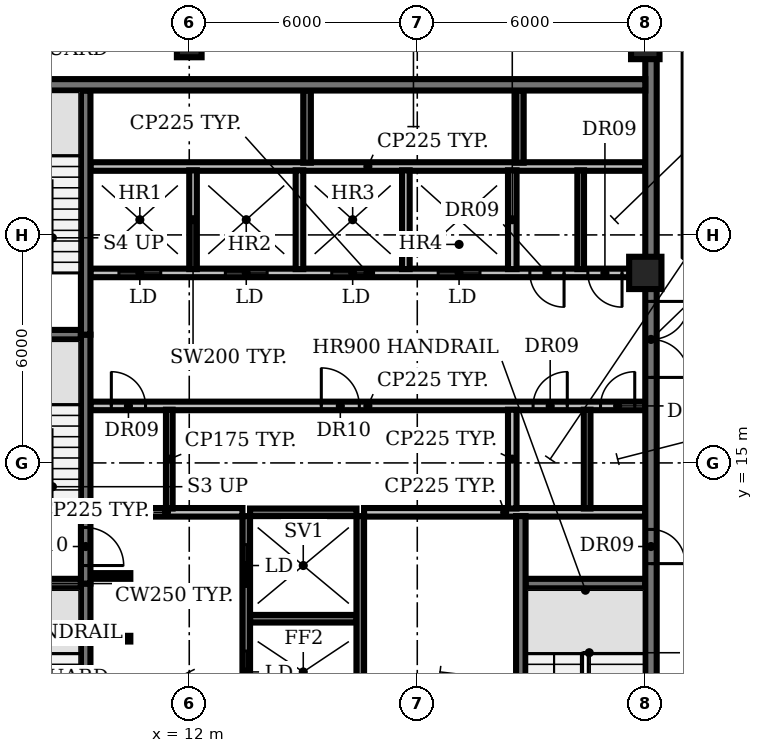
"""IFC4 building model, lengths in metres.
Left out: names, types, materials, properties, quantities, classifications, styles, units other than length and angle.
Written with IfcOpenShell. Run it as: python <this file> out.ifc"""

import sys

from ifc_helpers import new_model, si_unit, direction, frame, frame_2d, origin, origin_2d, place, context, subcontext, project, spatial, rectangle, circle, extrude, element, fill, save


model = new_model("IFC4")
c1 = context("Model", 3, precision=1e-05, world=origin(), true_north=direction((0.0, 1.0)))
c2 = subcontext(c1, "Body", "Model", "MODEL_VIEW")
j1 = project(units=[si_unit("LENGTHUNIT", "METRE"), si_unit("PLANEANGLEUNIT", "RADIAN")], contexts=[c1])
p1 = place(None, origin())
s1 = spatial("IfcSite", under=j1, at=p1, CompositionType="ELEMENT")
p2 = place(p1, origin())
s2 = spatial("IfcBuilding", under=s1, at=p2, CompositionType="ELEMENT")
p3 = place(p2, frame((0.0, 0.0, 285.2)))
s3 = spatial("IfcBuildingStorey", under=s2, at=p3, CompositionType="ELEMENT", Elevation=285.2)
p4 = place(p3, frame((12.0, 26.0, 0.0), z_axis=(0.0, 0.0, 1.0), x_axis=(1.0, 0.0, 0.0)))
e1 = element("IfcColumn", 1, at=p4, inside=s3, PredefinedType="COLUMN", context=c2, shape_type="SweptSolid", body=[
    extrude(rectangle(XDim=0.65, YDim=0.65, at=origin_2d()), origin(), (0.0, 0.0, 1.0), 3.85),
])
p5 = place(p3, frame((24.0, 20.0, 0.0), z_axis=(0.0, 0.0, 1.0), x_axis=(1.0, 0.0, 0.0)))
e2 = element("IfcColumn", 2, at=p5, inside=s3, PredefinedType="COLUMN", context=c2, shape_type="SweptSolid", body=[
    extrude(circle(Radius=0.425, at=origin_2d()), origin(), (0.0, 0.0, 1.0), 3.85),
])
p6 = place(p3, frame((24.0, 26.0, 0.0), z_axis=(0.0, 0.0, 1.0), x_axis=(1.0, 0.0, 0.0)))
e3 = element("IfcColumn", 3, at=p6, inside=s3, PredefinedType="COLUMN", context=c2, shape_type="SweptSolid", body=[
    extrude(rectangle(XDim=0.75, YDim=0.75, at=origin_2d()), origin(), (0.0, 0.0, 1.0), 3.85),
])
p7 = place(p3, frame((9.4, 10.375, 0.0), z_axis=(0.0, 0.0, 1.0), x_axis=(1.0, 0.0, 0.0)))
e4 = element("IfcWall", 4, at=p7, inside=s3, PredefinedType="SHEAR", context=c2, shape_type="SweptSolid", body=[
    extrude(rectangle(XDim=1.05, YDim=0.15, at=frame_2d((0.525, 0.0))), origin(), (0.0, 0.0, 1.0), 3.85),
])
p8 = place(p3, frame((13.6, 10.9, 0.0), z_axis=(0.0, 0.0, 1.0), x_axis=(1.0, 0.0, 0.0)))
e5 = element("IfcWall", 5, at=p8, inside=s3, PredefinedType="SHEAR", context=c2, shape_type="SweptSolid", body=[
    extrude(rectangle(XDim=2.8, YDim=0.2, at=frame_2d((1.4, 0.0))), origin(), (0.0, 0.0, 1.0), 3.85),
])
for number, where, z_axis, x_axis in (
    (6, (6.0, 11.825, 0.0), (0.0, 0.0, 1.0), (1.0, 0.0, 0.0)),
    (7, (20.85, 11.825, 0.0), (0.0, 0.0, 1.0), (1.0, 0.0, 0.0)),
):
    element("IfcWall", number, at=place(p3, frame(where, z_axis=z_axis, x_axis=x_axis)), inside=s3, PredefinedType="SHEAR", context=c2, shape_type="SweptSolid", body=[
        extrude(rectangle(XDim=3.15, YDim=0.25, at=frame_2d((1.575, 0.0))), origin(), (0.0, 0.0, 1.0), 3.85),
    ])
p9 = place(p3, frame((9.4, 12.025, 0.0), z_axis=(0.0, 0.0, 1.0), x_axis=(1.0, 0.0, 0.0)))
e8 = element("IfcWall", 8, at=p9, inside=s3, PredefinedType="SHEAR", context=c2, shape_type="SweptSolid", body=[
    extrude(rectangle(XDim=1.05, YDim=0.15, at=frame_2d((0.525, 0.0))), origin(), (0.0, 0.0, 1.0), 3.85),
])
p10 = place(p3, frame((9.4, 13.7, 0.0), z_axis=(0.0, 0.0, 1.0), x_axis=(1.0, 0.0, 0.0)))
e9 = element("IfcWall", 9, at=p10, inside=s3, PredefinedType="PARTITIONING", context=c2, shape_type="SweptSolid", body=[
    extrude(rectangle(XDim=4.0, YDim=0.225, at=frame_2d((2.0, 0.0))), origin(), (0.0, 0.0, 1.0), 3.85),
])
p11 = place(p3, frame((13.6, 13.7, 0.0), z_axis=(0.0, 0.0, 1.0), x_axis=(1.0, 0.0, 0.0)))
e10 = element("IfcWall", 10, at=p11, inside=s3, PredefinedType="SHEAR", context=c2, shape_type="SweptSolid", body=[
    extrude(rectangle(XDim=2.8, YDim=0.2, at=frame_2d((1.4, 0.0))), origin(), (0.0, 0.0, 1.0), 3.85),
])
p12 = place(p3, frame((16.6, 13.7, 0.0), z_axis=(0.0, 0.0, 1.0), x_axis=(1.0, 0.0, 0.0)))
e11 = element("IfcWall", 11, at=p12, inside=s3, PredefinedType="PARTITIONING", context=c2, shape_type="SweptSolid", body=[
    extrude(rectangle(XDim=7.4, YDim=0.225, at=frame_2d((3.7, 0.0))), origin(), (0.0, 0.0, 1.0), 3.85),
])
p13 = place(p3, frame((9.4, 16.5, 0.0), z_axis=(0.0, 0.0, 1.0), x_axis=(1.0, 0.0, 0.0)))
e12 = element("IfcWall", 12, at=p13, inside=s3, PredefinedType="PARTITIONING", context=c2, shape_type="SweptSolid", body=[
    extrude(rectangle(XDim=14.6, YDim=0.225, at=frame_2d((7.3, 0.0))), origin(), (0.0, 0.0, 1.0), 3.85),
])
p14 = place(p13, frame((0.55, 0.0, 0.0)))
e13 = element("IfcOpeningElement", 13, at=p14, cuts=e12, PredefinedType="OPENING", context=c2, shape_type="SweptSolid", body=[
    extrude(rectangle(XDim=0.9, YDim=2.1, at=frame_2d((0.45, 1.05))), frame((0.0, 0.123, 0.0), z_axis=(0.0, -1.0, 0.0), x_axis=(1.0, 0.0, 0.0)), (0.0, 0.0, 1.0), 0.245),
])
p15 = place(p13, frame((6.075, 0.0, 0.0)))
e14 = element("IfcOpeningElement", 14, at=p15, cuts=e12, PredefinedType="OPENING", context=c2, shape_type="SweptSolid", body=[
    extrude(rectangle(XDim=1.0, YDim=2.1, at=frame_2d((0.5, 1.05))), frame((0.0, 0.123, 0.0), z_axis=(0.0, -1.0, 0.0), x_axis=(1.0, 0.0, 0.0)), (0.0, 0.0, 1.0), 0.245),
])
p16 = place(p13, frame((11.647, 0.0, 0.0)))
e15 = element("IfcOpeningElement", 15, at=p16, cuts=e12, PredefinedType="OPENING", context=c2, shape_type="SweptSolid", body=[
    extrude(rectangle(XDim=0.9, YDim=2.1, at=frame_2d((0.45, 1.05))), frame((0.0, 0.123, 0.0), z_axis=(0.0, -1.0, 0.0), x_axis=(1.0, 0.0, 0.0)), (0.0, 0.0, 1.0), 0.245),
])
p17 = place(p13, frame((13.423, 0.0, 0.0)))
e16 = element("IfcOpeningElement", 16, at=p17, cuts=e12, PredefinedType="OPENING", context=c2, shape_type="SweptSolid", body=[
    extrude(rectangle(XDim=0.9, YDim=2.1, at=frame_2d((0.45, 1.05))), frame((0.0, 0.123, 0.0), z_axis=(0.0, -1.0, 0.0), x_axis=(1.0, 0.0, 0.0)), (0.0, 0.0, 1.0), 0.245),
])
p18 = place(p3, frame((6.0, 18.375, 0.0), z_axis=(0.0, 0.0, 1.0), x_axis=(1.0, 0.0, 0.0)))
e17 = element("IfcWall", 17, at=p18, inside=s3, PredefinedType="SHEAR", context=c2, shape_type="SweptSolid", body=[
    extrude(rectangle(XDim=3.15, YDim=0.25, at=frame_2d((1.575, 0.0))), origin(), (0.0, 0.0, 1.0), 3.85),
])
p19 = place(p3, frame((24.0, 20.0, 0.0), z_axis=(0.0, 0.0, 1.0), x_axis=(-1.0, 0.0, 0.0)))
e18 = element("IfcWall", 18, at=p19, inside=s3, PredefinedType="PARTITIONING", context=c2, shape_type="SweptSolid", body=[
    extrude(rectangle(XDim=14.6, YDim=0.225, at=frame_2d((7.3, 0.0))), origin(), (0.0, 0.0, 1.0), 3.85),
])
p20 = place(p19, frame((12.75, 0.0, 0.0)))
e19 = element("IfcOpeningElement", 19, at=p20, cuts=e18, PredefinedType="OPENING", context=c2, shape_type="SweptSolid", body=[
    extrude(rectangle(XDim=1.1, YDim=2.1, at=frame_2d((0.55, 1.05))), frame((0.0, 0.123, 0.0), z_axis=(0.0, -1.0, 0.0), x_axis=(1.0, 0.0, 0.0)), (0.0, 0.0, 1.0), 0.245),
])
p21 = place(p19, frame((9.95, 0.0, 0.0)))
e20 = element("IfcOpeningElement", 20, at=p21, cuts=e18, PredefinedType="OPENING", context=c2, shape_type="SweptSolid", body=[
    extrude(rectangle(XDim=1.1, YDim=2.1, at=frame_2d((0.55, 1.05))), frame((0.0, 0.123, 0.0), z_axis=(0.0, -1.0, 0.0), x_axis=(1.0, 0.0, 0.0)), (0.0, 0.0, 1.0), 0.245),
])
p22 = place(p19, frame((7.15, 0.0, 0.0)))
e21 = element("IfcOpeningElement", 21, at=p22, cuts=e18, PredefinedType="OPENING", context=c2, shape_type="SweptSolid", body=[
    extrude(rectangle(XDim=1.1, YDim=2.1, at=frame_2d((0.55, 1.05))), frame((0.0, 0.123, 0.0), z_axis=(0.0, -1.0, 0.0), x_axis=(1.0, 0.0, 0.0)), (0.0, 0.0, 1.0), 0.245),
])
p23 = place(p19, frame((4.35, 0.0, 0.0)))
e22 = element("IfcOpeningElement", 22, at=p23, cuts=e18, PredefinedType="OPENING", context=c2, shape_type="SweptSolid", body=[
    extrude(rectangle(XDim=1.1, YDim=2.1, at=frame_2d((0.55, 1.05))), frame((0.0, 0.123, 0.0), z_axis=(0.0, -1.0, 0.0), x_axis=(1.0, 0.0, 0.0)), (0.0, 0.0, 1.0), 0.245),
])
p24 = place(p19, frame((2.137, 0.0, 0.0)))
e23 = element("IfcOpeningElement", 23, at=p24, cuts=e18, PredefinedType="OPENING", context=c2, shape_type="SweptSolid", body=[
    extrude(rectangle(XDim=0.9, YDim=2.1, at=frame_2d((0.45, 1.05))), frame((0.0, 0.123, 0.0), z_axis=(0.0, -1.0, 0.0), x_axis=(1.0, 0.0, 0.0)), (0.0, 0.0, 1.0), 0.245),
])
p25 = place(p19, frame((0.612, 0.0, 0.0)))
e24 = element("IfcOpeningElement", 24, at=p25, cuts=e18, PredefinedType="OPENING", context=c2, shape_type="SweptSolid", body=[
    extrude(rectangle(XDim=0.9, YDim=2.1, at=frame_2d((0.45, 1.05))), frame((0.0, 0.123, 0.0), z_axis=(0.0, -1.0, 0.0), x_axis=(1.0, 0.0, 0.0)), (0.0, 0.0, 1.0), 0.245),
])
p26 = place(p3, frame((9.4, 22.8, 0.0), z_axis=(0.0, 0.0, 1.0), x_axis=(1.0, 0.0, 0.0)))
e25 = element("IfcWall", 25, at=p26, inside=s3, PredefinedType="PARTITIONING", context=c2, shape_type="SweptSolid", body=[
    extrude(rectangle(XDim=14.6, YDim=0.225, at=frame_2d((7.3, 0.0))), origin(), (0.0, 0.0, 1.0), 3.85),
])
p27 = place(p3, frame((9.275, 11.825, 0.0), z_axis=(0.0, 0.0, 1.0), x_axis=(0.0, -1.0, 0.0)))
e26 = element("IfcWall", 26, at=p27, inside=s3, PredefinedType="SHEAR", context=c2, shape_type="SweptSolid", body=[
    extrude(rectangle(XDim=6.425, YDim=0.25, at=frame_2d((3.212, 0.0))), origin(), (0.0, 0.0, 1.0), 3.85),
])
p28 = place(p27, frame((5.075, 0.0, 0.0)))
e27 = element("IfcOpeningElement", 27, at=p28, cuts=e26, PredefinedType="OPENING", context=c2, shape_type="SweptSolid", body=[
    extrude(rectangle(XDim=1.0, YDim=2.1, at=frame_2d((0.5, 1.05))), frame((0.0, 0.135, 0.0), z_axis=(0.0, -1.0, 0.0), x_axis=(1.0, 0.0, 0.0)), (0.0, 0.0, 1.0), 0.27),
])
p29 = place(p3, frame((9.275, 18.375, 0.0), z_axis=(0.0, 0.0, 1.0), x_axis=(0.0, -1.0, 0.0)))
e28 = element("IfcWall", 28, at=p29, inside=s3, PredefinedType="SHEAR", context=c2, shape_type="SweptSolid", body=[
    extrude(rectangle(XDim=6.55, YDim=0.25, at=frame_2d((3.275, 0.0))), origin(), (0.0, 0.0, 1.0), 3.85),
])
p30 = place(p29, frame((5.075, 0.0, 0.0)))
e29 = element("IfcOpeningElement", 29, at=p30, cuts=e28, PredefinedType="OPENING", context=c2, shape_type="SweptSolid", body=[
    extrude(rectangle(XDim=1.0, YDim=2.1, at=frame_2d((0.5, 1.05))), frame((0.0, 0.135, 0.0), z_axis=(0.0, -1.0, 0.0), x_axis=(1.0, 0.0, 0.0)), (0.0, 0.0, 1.0), 0.27),
])
p31 = place(p3, frame((9.275, 18.375, 0.0), z_axis=(0.0, 0.0, 1.0), x_axis=(0.0, 1.0, 0.0)))
e30 = element("IfcWall", 30, at=p31, inside=s3, PredefinedType="SHEAR", context=c2, shape_type="SweptSolid", body=[
    extrude(rectangle(XDim=6.425, YDim=0.25, at=frame_2d((3.212, 0.0))), origin(), (0.0, 0.0, 1.0), 3.85),
])
p32 = place(p3, frame((11.475, 13.8, 0.0), z_axis=(0.0, 0.0, 1.0), x_axis=(0.0, 1.0, 0.0)))
e31 = element("IfcWall", 31, at=p32, inside=s3, PredefinedType="PARTITIONING", context=c2, shape_type="SweptSolid", body=[
    extrude(rectangle(XDim=2.6, YDim=0.175, at=frame_2d((1.3, 0.0))), origin(), (0.0, 0.0, 1.0), 3.85),
])
p33 = place(p3, frame((12.1, 20.1, 0.0), z_axis=(0.0, 0.0, 1.0), x_axis=(0.0, 1.0, 0.0)))
e32 = element("IfcWall", 32, at=p33, inside=s3, PredefinedType="SOLIDWALL", context=c2, shape_type="SweptSolid", body=[
    extrude(rectangle(XDim=2.6, YDim=0.2, at=frame_2d((1.3, 0.0))), origin(), (0.0, 0.0, 1.0), 3.85),
])
p34 = place(p3, frame((13.5, 5.4, 0.0), z_axis=(0.0, 0.0, 1.0), x_axis=(0.0, 1.0, 0.0)))
e33 = element("IfcWall", 33, at=p34, inside=s3, PredefinedType="SHEAR", context=c2, shape_type="SweptSolid", body=[
    extrude(rectangle(XDim=8.2, YDim=0.2, at=frame_2d((4.1, 0.0))), origin(), (0.0, 0.0, 1.0), 3.85),
])
p35 = place(p34, frame((0.75, 0.0, 0.0)))
e34 = element("IfcOpeningElement", 34, at=p35, cuts=e33, PredefinedType="OPENING", context=c2, shape_type="SweptSolid", body=[
    extrude(rectangle(XDim=1.1, YDim=2.1, at=frame_2d((0.55, 1.05))), frame((0.0, 0.11, 0.0), z_axis=(0.0, -1.0, 0.0), x_axis=(1.0, 0.0, 0.0)), (0.0, 0.0, 1.0), 0.22),
])
p36 = place(p34, frame((3.55, 0.0, 0.0)))
e35 = element("IfcOpeningElement", 35, at=p36, cuts=e33, PredefinedType="OPENING", context=c2, shape_type="SweptSolid", body=[
    extrude(rectangle(XDim=1.1, YDim=2.1, at=frame_2d((0.55, 1.05))), frame((0.0, 0.11, 0.0), z_axis=(0.0, -1.0, 0.0), x_axis=(1.0, 0.0, 0.0)), (0.0, 0.0, 1.0), 0.22),
])
p37 = place(p34, frame((6.35, 0.0, 0.0)))
e36 = element("IfcOpeningElement", 36, at=p37, cuts=e33, PredefinedType="OPENING", context=c2, shape_type="SweptSolid", body=[
    extrude(rectangle(XDim=1.1, YDim=2.1, at=frame_2d((0.55, 1.05))), frame((0.0, 0.11, 0.0), z_axis=(0.0, -1.0, 0.0), x_axis=(1.0, 0.0, 0.0)), (0.0, 0.0, 1.0), 0.22),
])
p38 = place(p3, frame((14.9, 20.1, 0.0), z_axis=(0.0, 0.0, 1.0), x_axis=(0.0, 1.0, 0.0)))
e37 = element("IfcWall", 37, at=p38, inside=s3, PredefinedType="SOLIDWALL", context=c2, shape_type="SweptSolid", body=[
    extrude(rectangle(XDim=2.6, YDim=0.2, at=frame_2d((1.3, 0.0))), origin(), (0.0, 0.0, 1.0), 3.85),
])
p39 = place(p3, frame((15.1, 22.9, 0.0), z_axis=(0.0, 0.0, 1.0), x_axis=(0.0, 1.0, 0.0)))
e38 = element("IfcWall", 38, at=p39, inside=s3, PredefinedType="SHEAR", context=c2, shape_type="SweptSolid", body=[
    extrude(rectangle(XDim=1.9, YDim=0.2, at=frame_2d((0.95, 0.0))), origin(), (0.0, 0.0, 1.0), 3.85),
])
p40 = place(p3, frame((16.5, 5.4, 0.0), z_axis=(0.0, 0.0, 1.0), x_axis=(0.0, 1.0, 0.0)))
e39 = element("IfcWall", 39, at=p40, inside=s3, PredefinedType="SHEAR", context=c2, shape_type="SweptSolid", body=[
    extrude(rectangle(XDim=8.2, YDim=0.2, at=frame_2d((4.1, 0.0))), origin(), (0.0, 0.0, 1.0), 3.85),
])
p41 = place(p3, frame((17.7, 20.1, 0.0), z_axis=(0.0, 0.0, 1.0), x_axis=(0.0, 1.0, 0.0)))
e40 = element("IfcWall", 40, at=p41, inside=s3, PredefinedType="SOLIDWALL", context=c2, shape_type="SweptSolid", body=[
    extrude(rectangle(XDim=2.6, YDim=0.2, at=frame_2d((1.3, 0.0))), origin(), (0.0, 0.0, 1.0), 3.85),
])
for number, where, z_axis, x_axis in (
    (41, (20.5, 13.8, 0.0), (0.0, 0.0, 1.0), (0.0, 1.0, 0.0)),
    (42, (20.5, 20.1, 0.0), (0.0, 0.0, 1.0), (0.0, 1.0, 0.0)),
):
    element("IfcWall", number, at=place(p3, frame(where, z_axis=z_axis, x_axis=x_axis)), inside=s3, PredefinedType="PARTITIONING", context=c2, shape_type="SweptSolid", body=[
        extrude(rectangle(XDim=2.6, YDim=0.225, at=frame_2d((1.3, 0.0))), origin(), (0.0, 0.0, 1.0), 3.85),
    ])
p42 = place(p3, frame((20.7, 22.9, 0.0), z_axis=(0.0, 0.0, 1.0), x_axis=(0.0, 1.0, 0.0)))
e43 = element("IfcWall", 43, at=p42, inside=s3, PredefinedType="SHEAR", context=c2, shape_type="SweptSolid", body=[
    extrude(rectangle(XDim=1.9, YDim=0.2, at=frame_2d((0.95, 0.0))), origin(), (0.0, 0.0, 1.0), 3.85),
])
p43 = place(p3, frame((20.725, 5.4, 0.0), z_axis=(0.0, 0.0, 1.0), x_axis=(0.0, 1.0, 0.0)))
e44 = element("IfcWall", 44, at=p43, inside=s3, PredefinedType="SHEAR", context=c2, shape_type="SweptSolid", body=[
    extrude(rectangle(XDim=8.2, YDim=0.25, at=frame_2d((4.1, 0.0))), origin(), (0.0, 0.0, 1.0), 3.85),
])
for number, where, z_axis, x_axis in (
    (45, (22.3, 20.1, 0.0), (0.0, 0.0, 1.0), (0.0, 1.0, 0.0)),
    (46, (22.47, 13.8, 0.0), (0.0, 0.0, 1.0), (0.0, 1.0, 0.0)),
):
    element("IfcWall", number, at=place(p3, frame(where, z_axis=z_axis, x_axis=x_axis)), inside=s3, PredefinedType="PARTITIONING", context=c2, shape_type="SweptSolid", body=[
        extrude(rectangle(XDim=2.6, YDim=0.175, at=frame_2d((1.3, 0.0))), origin(), (0.0, 0.0, 1.0), 3.85),
    ])
p44 = place(p3, frame((24.15, 25.655, 0.0), z_axis=(0.0, 0.0, 1.0), x_axis=(0.0, -1.0, 0.0)))
e47 = element("IfcWall", 47, at=p44, inside=s3, PredefinedType="SHEAR", context=c2, shape_type="SweptSolid", body=[
    extrude(rectangle(XDim=20.555, YDim=0.3, at=frame_2d((10.277, 0.0))), origin(), (0.0, 0.0, 1.0), 3.85),
])
p45 = place(p44, frame((18.505, 0.0, 0.0)))
e48 = element("IfcOpeningElement", 48, at=p45, cuts=e47, PredefinedType="OPENING", context=c2, shape_type="SweptSolid", body=[
    extrude(rectangle(XDim=1.5, YDim=2.1, at=frame_2d((0.75, 1.05))), frame((0.0, 0.16, 0.0), z_axis=(0.0, -1.0, 0.0), x_axis=(1.0, 0.0, 0.0)), (0.0, 0.0, 1.0), 0.32),
])
p46 = place(p44, frame((12.405, 0.0, 0.0)))
e49 = element("IfcOpeningElement", 49, at=p46, cuts=e47, PredefinedType="OPENING", context=c2, shape_type="SweptSolid", body=[
    extrude(rectangle(XDim=0.9, YDim=2.1, at=frame_2d((0.45, 1.05))), frame((0.0, 0.16, 0.0), z_axis=(0.0, -1.0, 0.0), x_axis=(1.0, 0.0, 0.0)), (0.0, 0.0, 1.0), 0.32),
])
p47 = place(p44, frame((6.405, 0.0, 0.0)))
e50 = element("IfcOpeningElement", 50, at=p47, cuts=e47, PredefinedType="OPENING", context=c2, shape_type="SweptSolid", body=[
    extrude(rectangle(XDim=2.0, YDim=2.1, at=frame_2d((1.0, 1.05))), frame((0.0, 0.16, 0.0), z_axis=(0.0, -1.0, 0.0), x_axis=(1.0, 0.0, 0.0)), (0.0, 0.0, 1.0), 0.32),
])
p48 = place(p3, frame((6.0, 24.95, 0.0), z_axis=(0.0, 0.0, 1.0), x_axis=(1.0, 0.0, 0.0)))
e51 = element("IfcWall", 51, at=p48, inside=s3, PredefinedType="SHEAR", context=c2, shape_type="SweptSolid", body=[
    extrude(rectangle(XDim=18.0, YDim=0.3, at=frame_2d((9.0, 0.0))), origin(), (0.0, 0.0, 1.0), 3.85),
])
p49 = place(p14, origin())
e52 = element("IfcDoor", 52, at=p49, inside=s3, OperationType="SINGLE_SWING_LEFT", PredefinedType="DOOR", context=c2, shape_type="SweptSolid", body=[
    extrude(rectangle(XDim=0.9, YDim=2.1, at=frame_2d((0.45, 1.05))), frame((0.0, 0.025, 0.0), z_axis=(0.0, -1.0, 0.0), x_axis=(1.0, 0.0, 0.0)), (0.0, 0.0, 1.0), 0.05),
])
fill(e13, e52)
p50 = place(p15, origin())
e53 = element("IfcDoor", 53, at=p50, inside=s3, OperationType="SINGLE_SWING_LEFT", PredefinedType="DOOR", context=c2, shape_type="SweptSolid", body=[
    extrude(rectangle(XDim=1.0, YDim=2.1, at=frame_2d((0.5, 1.05))), frame((0.0, 0.025, 0.0), z_axis=(0.0, -1.0, 0.0), x_axis=(1.0, 0.0, 0.0)), (0.0, 0.0, 1.0), 0.05),
])
fill(e14, e53)
p51 = place(p16, origin())
e54 = element("IfcDoor", 54, at=p51, inside=s3, OperationType="SINGLE_SWING_RIGHT", PredefinedType="DOOR", context=c2, shape_type="SweptSolid", body=[
    extrude(rectangle(XDim=0.9, YDim=2.1, at=frame_2d((0.45, 1.05))), frame((0.0, 0.025, 0.0), z_axis=(0.0, -1.0, 0.0), x_axis=(1.0, 0.0, 0.0)), (0.0, 0.0, 1.0), 0.05),
])
fill(e15, e54)
p52 = place(p17, origin())
e55 = element("IfcDoor", 55, at=p52, inside=s3, OperationType="SINGLE_SWING_RIGHT", PredefinedType="DOOR", context=c2, shape_type="SweptSolid", body=[
    extrude(rectangle(XDim=0.9, YDim=2.1, at=frame_2d((0.45, 1.05))), frame((0.0, 0.025, 0.0), z_axis=(0.0, -1.0, 0.0), x_axis=(1.0, 0.0, 0.0)), (0.0, 0.0, 1.0), 0.05),
])
fill(e16, e55)
p53 = place(p20, origin())
e56 = element("IfcDoor", 56, at=p53, inside=s3, OperationType="DOUBLE_DOOR_SLIDING", PredefinedType="DOOR", context=c2, shape_type="SweptSolid", body=[
    extrude(rectangle(XDim=1.1, YDim=2.1, at=frame_2d((0.55, 1.05))), frame((0.0, 0.025, 0.0), z_axis=(0.0, -1.0, 0.0), x_axis=(1.0, 0.0, 0.0)), (0.0, 0.0, 1.0), 0.05),
])
fill(e19, e56)
p54 = place(p21, origin())
e57 = element("IfcDoor", 57, at=p54, inside=s3, OperationType="DOUBLE_DOOR_SLIDING", PredefinedType="DOOR", context=c2, shape_type="SweptSolid", body=[
    extrude(rectangle(XDim=1.1, YDim=2.1, at=frame_2d((0.55, 1.05))), frame((0.0, 0.025, 0.0), z_axis=(0.0, -1.0, 0.0), x_axis=(1.0, 0.0, 0.0)), (0.0, 0.0, 1.0), 0.05),
])
fill(e20, e57)
p55 = place(p22, origin())
e58 = element("IfcDoor", 58, at=p55, inside=s3, OperationType="DOUBLE_DOOR_SLIDING", PredefinedType="DOOR", context=c2, shape_type="SweptSolid", body=[
    extrude(rectangle(XDim=1.1, YDim=2.1, at=frame_2d((0.55, 1.05))), frame((0.0, 0.025, 0.0), z_axis=(0.0, -1.0, 0.0), x_axis=(1.0, 0.0, 0.0)), (0.0, 0.0, 1.0), 0.05),
])
fill(e21, e58)
p56 = place(p23, origin())
e59 = element("IfcDoor", 59, at=p56, inside=s3, OperationType="DOUBLE_DOOR_SLIDING", PredefinedType="DOOR", context=c2, shape_type="SweptSolid", body=[
    extrude(rectangle(XDim=1.1, YDim=2.1, at=frame_2d((0.55, 1.05))), frame((0.0, 0.025, 0.0), z_axis=(0.0, -1.0, 0.0), x_axis=(1.0, 0.0, 0.0)), (0.0, 0.0, 1.0), 0.05),
])
fill(e22, e59)
p57 = place(p24, origin())
e60 = element("IfcDoor", 60, at=p57, inside=s3, OperationType="SINGLE_SWING_LEFT", PredefinedType="DOOR", context=c2, shape_type="SweptSolid", body=[
    extrude(rectangle(XDim=0.9, YDim=2.1, at=frame_2d((0.45, 1.05))), frame((0.0, 0.025, 0.0), z_axis=(0.0, -1.0, 0.0), x_axis=(1.0, 0.0, 0.0)), (0.0, 0.0, 1.0), 0.05),
])
fill(e23, e60)
p58 = place(p25, origin())
e61 = element("IfcDoor", 61, at=p58, inside=s3, OperationType="SINGLE_SWING_LEFT", PredefinedType="DOOR", context=c2, shape_type="SweptSolid", body=[
    extrude(rectangle(XDim=0.9, YDim=2.1, at=frame_2d((0.45, 1.05))), frame((0.0, 0.025, 0.0), z_axis=(0.0, -1.0, 0.0), x_axis=(1.0, 0.0, 0.0)), (0.0, 0.0, 1.0), 0.05),
])
fill(e24, e61)
p59 = place(p30, origin())
e62 = element("IfcDoor", 62, at=p59, inside=s3, OperationType="SINGLE_SWING_RIGHT", PredefinedType="DOOR", context=c2, shape_type="SweptSolid", body=[
    extrude(rectangle(XDim=1.0, YDim=2.1, at=frame_2d((0.5, 1.05))), frame((0.0, 0.025, 0.0), z_axis=(0.0, -1.0, 0.0), x_axis=(1.0, 0.0, 0.0)), (0.0, 0.0, 1.0), 0.05),
])
fill(e29, e62)
p60 = place(p36, origin())
e63 = element("IfcDoor", 63, at=p60, inside=s3, OperationType="DOUBLE_DOOR_SLIDING", PredefinedType="DOOR", context=c2, shape_type="SweptSolid", body=[
    extrude(rectangle(XDim=1.1, YDim=2.1, at=frame_2d((0.55, 1.05))), frame((0.0, 0.025, 0.0), z_axis=(0.0, -1.0, 0.0), x_axis=(1.0, 0.0, 0.0)), (0.0, 0.0, 1.0), 0.05),
])
fill(e35, e63)
p61 = place(p37, origin())
e64 = element("IfcDoor", 64, at=p61, inside=s3, OperationType="DOUBLE_DOOR_SLIDING", PredefinedType="DOOR", context=c2, shape_type="SweptSolid", body=[
    extrude(rectangle(XDim=1.1, YDim=2.1, at=frame_2d((0.55, 1.05))), frame((0.0, 0.025, 0.0), z_axis=(0.0, -1.0, 0.0), x_axis=(1.0, 0.0, 0.0)), (0.0, 0.0, 1.0), 0.05),
])
fill(e36, e64)
p62 = place(p46, origin())
e65 = element("IfcDoor", 65, at=p62, inside=s3, OperationType="SINGLE_SWING_RIGHT", PredefinedType="DOOR", context=c2, shape_type="SweptSolid", body=[
    extrude(rectangle(XDim=0.9, YDim=2.1, at=frame_2d((0.45, 1.05))), frame((0.0, 0.025, 0.0), z_axis=(0.0, -1.0, 0.0), x_axis=(1.0, 0.0, 0.0)), (0.0, 0.0, 1.0), 0.05),
])
fill(e49, e65)
p63 = place(p47, origin())
e66 = element("IfcDoor", 66, at=p63, inside=s3, OperationType="DOUBLE_DOOR_SINGLE_SWING", PredefinedType="DOOR", context=c2, shape_type="SweptSolid", body=[
    extrude(rectangle(XDim=2.0, YDim=2.1, at=frame_2d((1.0, 1.05))), frame((0.0, 0.025, 0.0), z_axis=(0.0, -1.0, 0.0), x_axis=(1.0, 0.0, 0.0)), (0.0, 0.0, 1.0), 0.05),
])
fill(e50, e66)
save(model, sys.argv[1])
